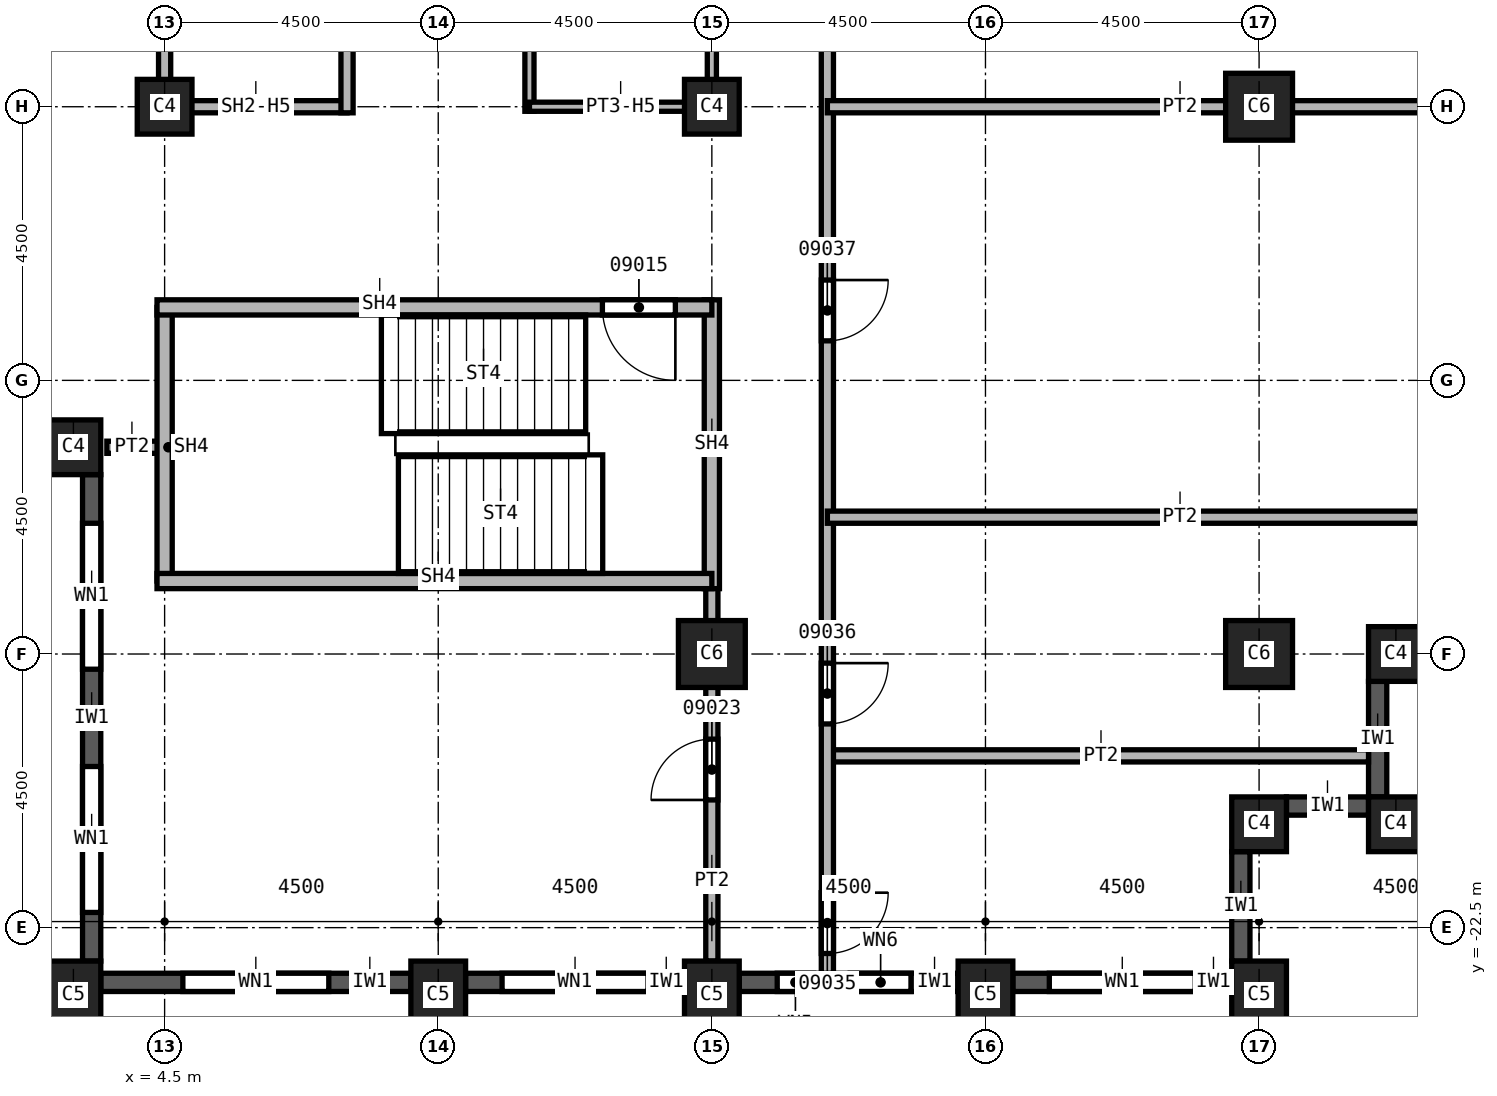
"""IFC4 building model, lengths in metres.
Left out: names, types, materials, properties, quantities, classifications, styles, units other than length and angle.
Written with IfcOpenShell. Run it as: python <this file> out.ifc"""

import sys

from ifc_helpers import new_model, si_unit, direction, frame, frame_2d, origin, origin_2d, place, context, subcontext, project, spatial, rectangle, extrude, element, fill, save


model = new_model("IFC4")
c1 = context("Model", 3, precision=1e-05, world=origin(), true_north=direction((0.0, 1.0)))
c2 = subcontext(c1, "Body", "Model", "MODEL_VIEW")
j1 = project(units=[si_unit("LENGTHUNIT", "METRE"), si_unit("PLANEANGLEUNIT", "RADIAN")], contexts=[c1])
p1 = place(None, origin())
s1 = spatial("IfcSite", under=j1, at=p1, CompositionType="ELEMENT")
p2 = place(p1, origin())
s2 = spatial("IfcBuilding", under=s1, at=p2, CompositionType="ELEMENT")
p3 = place(p2, frame((0.0, 0.0, 166.0)))
s3 = spatial("IfcBuildingStorey", under=s2, at=p3, CompositionType="ELEMENT", Elevation=166.0)
for number, where, z_axis, x_axis in (
    (1, (13.5, -18.0, 0.0), (0.0, 0.0, 1.0), (1.0, 0.0, 0.0)),
    (2, (22.5, -9.0, 0.0), (0.0, 0.0, 1.0), (1.0, 0.0, 0.0)),
    (3, (22.5, -18.0, 0.0), (0.0, 0.0, 1.0), (1.0, 0.0, 0.0)),
):
    element("IfcColumn", number, at=place(p3, frame(where, z_axis=z_axis, x_axis=x_axis)), inside=s3, PredefinedType="COLUMN", context=c2, shape_type="SweptSolid", body=[
        extrude(rectangle(XDim=1.1, YDim=1.1, at=origin_2d()), origin(), (0.0, 0.0, 1.0), 3.7),
    ])
for number, where, z_axis, x_axis in (
    (4, (4.5, -9.0, 0.0), (0.0, 0.0, 1.0), (1.0, 0.0, 0.0)),
    (5, (13.5, -9.0, 0.0), (0.0, 0.0, 1.0), (1.0, 0.0, 0.0)),
):
    element("IfcColumn", number, at=place(p3, frame(where, z_axis=z_axis, x_axis=x_axis)), inside=s3, PredefinedType="COLUMN", context=c2, shape_type="SweptSolid", body=[
        extrude(rectangle(XDim=0.9, YDim=0.9, at=origin_2d()), origin(), (0.0, 0.0, 1.0), 3.7),
    ])
for number, where, z_axis, x_axis in (
    (6, (3.0, -23.6, 0.0), (0.0, 0.0, 1.0), (1.0, 0.0, 0.0)),
    (7, (9.0, -23.6, 0.0), (0.0, 0.0, 1.0), (1.0, 0.0, 0.0)),
    (8, (13.5, -23.6, 0.0), (0.0, 0.0, 1.0), (1.0, 0.0, 0.0)),
    (9, (18.0, -23.6, 0.0), (0.0, 0.0, 1.0), (1.0, 0.0, 0.0)),
    (10, (22.5, -23.6, 0.0), (0.0, 0.0, 1.0), (1.0, 0.0, 0.0)),
):
    element("IfcColumn", number, at=place(p3, frame(where, z_axis=z_axis, x_axis=x_axis)), inside=s3, PredefinedType="COLUMN", context=c2, shape_type="SweptSolid", body=[
        extrude(rectangle(XDim=0.9, YDim=1.1, at=origin_2d()), origin(), (0.0, 0.0, 1.0), 3.7),
    ])
for number, where, z_axis, x_axis in (
    (11, (3.0, -14.6, 0.0), (0.0, 0.0, 1.0), (1.0, 0.0, 0.0)),
    (12, (22.5, -20.8, 0.0), (0.0, 0.0, 1.0), (1.0, 0.0, 0.0)),
    (13, (24.75, -20.8, 0.0), (0.0, 0.0, 1.0), (1.0, 0.0, 0.0)),
    (14, (24.75, -18.0, 0.0), (0.0, 0.0, 1.0), (1.0, 0.0, 0.0)),
):
    element("IfcColumn", number, at=place(p3, frame(where, z_axis=z_axis, x_axis=x_axis)), inside=s3, PredefinedType="COLUMN", context=c2, shape_type="SweptSolid", body=[
        extrude(rectangle(XDim=0.9, YDim=0.9, at=origin_2d()), origin(), (0.0, 0.0, 1.0), 3.7),
    ])
p4 = place(p3, frame((3.3, -15.05, 0.0), z_axis=(0.0, 0.0, 1.0), x_axis=(0.0, -1.0, 0.0)))
e15 = element("IfcWall", 15, at=p4, inside=s3, PredefinedType="SOLIDWALL", context=c2, shape_type="SweptSolid", body=[
    extrude(rectangle(XDim=8.0, YDim=0.3, at=frame_2d((4.0, 0.0))), origin(), (0.0, 0.0, 1.0), 3.1),
])
p5 = place(p4, frame((0.8, 0.0, 0.8)))
e16 = element("IfcOpeningElement", 16, at=p5, cuts=e15, PredefinedType="OPENING", context=c2, shape_type="SweptSolid", body=[
    extrude(rectangle(XDim=2.4, YDim=1.95, at=frame_2d((1.2, 0.975))), frame((0.0, 0.15, 0.0), z_axis=(0.0, -1.0, 0.0), x_axis=(1.0, 0.0, 0.0)), (0.0, 0.0, 1.0), 0.3),
])
p6 = place(p4, frame((4.8, 0.0, 0.8)))
e17 = element("IfcOpeningElement", 17, at=p6, cuts=e15, PredefinedType="OPENING", context=c2, shape_type="SweptSolid", body=[
    extrude(rectangle(XDim=2.4, YDim=1.95, at=frame_2d((1.2, 0.975))), frame((0.0, 0.15, 0.0), z_axis=(0.0, -1.0, 0.0), x_axis=(1.0, 0.0, 0.0)), (0.0, 0.0, 1.0), 0.3),
])
p7 = place(p3, frame((3.45, -23.4, 0.0), z_axis=(0.0, 0.0, 1.0), x_axis=(1.0, 0.0, 0.0)))
e18 = element("IfcWall", 18, at=p7, inside=s3, PredefinedType="SOLIDWALL", context=c2, shape_type="SweptSolid", body=[
    extrude(rectangle(XDim=5.1, YDim=0.3, at=frame_2d((2.55, 0.0))), origin(), (0.0, 0.0, 1.0), 3.1),
])
p8 = place(p7, frame((1.35, 0.0, 0.8)))
e19 = element("IfcOpeningElement", 19, at=p8, cuts=e18, PredefinedType="OPENING", context=c2, shape_type="SweptSolid", body=[
    extrude(rectangle(XDim=2.4, YDim=1.95, at=frame_2d((1.2, 0.975))), frame((0.0, 0.15, 0.0), z_axis=(0.0, -1.0, 0.0), x_axis=(1.0, 0.0, 0.0)), (0.0, 0.0, 1.0), 0.3),
])
p9 = place(p3, frame((9.45, -23.4, 0.0), z_axis=(0.0, 0.0, 1.0), x_axis=(1.0, 0.0, 0.0)))
e20 = element("IfcWall", 20, at=p9, inside=s3, PredefinedType="SOLIDWALL", context=c2, shape_type="SweptSolid", body=[
    extrude(rectangle(XDim=3.6, YDim=0.3, at=frame_2d((1.8, 0.0))), origin(), (0.0, 0.0, 1.0), 3.1),
])
p10 = place(p9, frame((0.6, 0.0, 0.8)))
e21 = element("IfcOpeningElement", 21, at=p10, cuts=e20, PredefinedType="OPENING", context=c2, shape_type="SweptSolid", body=[
    extrude(rectangle(XDim=2.4, YDim=1.95, at=frame_2d((1.2, 0.975))), frame((0.0, 0.15, 0.0), z_axis=(0.0, -1.0, 0.0), x_axis=(1.0, 0.0, 0.0)), (0.0, 0.0, 1.0), 0.3),
])
p11 = place(p3, frame((13.95, -23.4, 0.0), z_axis=(0.0, 0.0, 1.0), x_axis=(1.0, 0.0, 0.0)))
e22 = element("IfcWall", 22, at=p11, inside=s3, PredefinedType="SOLIDWALL", context=c2, shape_type="SweptSolid", body=[
    extrude(rectangle(XDim=3.6, YDim=0.3, at=frame_2d((1.8, 0.0))), origin(), (0.0, 0.0, 1.0), 3.1),
])
p12 = place(p11, frame((0.625, 0.0, 0.8)))
e23 = element("IfcOpeningElement", 23, at=p12, cuts=e22, PredefinedType="OPENING", context=c2, shape_type="SweptSolid", body=[
    extrude(rectangle(XDim=0.6, YDim=1.95, at=frame_2d((0.3, 0.975))), frame((0.0, 0.15, 0.0), z_axis=(0.0, -1.0, 0.0), x_axis=(1.0, 0.0, 0.0)), (0.0, 0.0, 1.0), 0.3),
])
p13 = place(p11, frame((1.825, 0.0, 0.8)))
e24 = element("IfcOpeningElement", 24, at=p13, cuts=e22, PredefinedType="OPENING", context=c2, shape_type="SweptSolid", body=[
    extrude(rectangle(XDim=1.0, YDim=1.95, at=frame_2d((0.5, 0.975))), frame((0.0, 0.15, 0.0), z_axis=(0.0, -1.0, 0.0), x_axis=(1.0, 0.0, 0.0)), (0.0, 0.0, 1.0), 0.3),
])
p14 = place(p3, frame((18.45, -23.4, 0.0), z_axis=(0.0, 0.0, 1.0), x_axis=(1.0, 0.0, 0.0)))
e25 = element("IfcWall", 25, at=p14, inside=s3, PredefinedType="SOLIDWALL", context=c2, shape_type="SweptSolid", body=[
    extrude(rectangle(XDim=3.6, YDim=0.3, at=frame_2d((1.8, 0.0))), origin(), (0.0, 0.0, 1.0), 3.1),
])
p15 = place(p14, frame((0.6, 0.0, 0.8)))
e26 = element("IfcOpeningElement", 26, at=p15, cuts=e25, PredefinedType="OPENING", context=c2, shape_type="SweptSolid", body=[
    extrude(rectangle(XDim=2.4, YDim=1.95, at=frame_2d((1.2, 0.975))), frame((0.0, 0.15, 0.0), z_axis=(0.0, -1.0, 0.0), x_axis=(1.0, 0.0, 0.0)), (0.0, 0.0, 1.0), 0.3),
])
p16 = place(p3, frame((22.2, -23.05, 0.0), z_axis=(0.0, 0.0, 1.0), x_axis=(0.0, 1.0, 0.0)))
e27 = element("IfcWall", 27, at=p16, inside=s3, PredefinedType="SOLIDWALL", context=c2, shape_type="SweptSolid", body=[
    extrude(rectangle(XDim=1.8, YDim=0.3, at=frame_2d((0.9, 0.0))), origin(), (0.0, 0.0, 1.0), 3.1),
])
p17 = place(p3, frame((22.95, -20.5, 0.0), z_axis=(0.0, 0.0, 1.0), x_axis=(1.0, 0.0, 0.0)))
e28 = element("IfcWall", 28, at=p17, inside=s3, PredefinedType="SOLIDWALL", context=c2, shape_type="SweptSolid", body=[
    extrude(rectangle(XDim=1.35, YDim=0.3, at=frame_2d((0.675, 0.0))), origin(), (0.0, 0.0, 1.0), 3.1),
])
p18 = place(p3, frame((24.45, -20.35, 0.0), z_axis=(0.0, 0.0, 1.0), x_axis=(0.0, 1.0, 0.0)))
e29 = element("IfcWall", 29, at=p18, inside=s3, PredefinedType="SOLIDWALL", context=c2, shape_type="SweptSolid", body=[
    extrude(rectangle(XDim=1.9, YDim=0.3, at=frame_2d((0.95, 0.0))), origin(), (0.0, 0.0, 1.0), 3.1),
])
p19 = place(p3, frame((4.5, -14.6, 0.0), z_axis=(0.0, 0.0, 1.0), x_axis=(-1.0, 0.0, 0.0)))
e30 = element("IfcWall", 30, at=p19, inside=s3, PredefinedType="PARTITIONING", context=c2, shape_type="SweptSolid", body=[
    extrude(rectangle(XDim=0.95, YDim=0.2, at=frame_2d((0.475, 0.0))), origin(), (0.0, 0.0, 1.0), 3.7),
])
p20 = place(p3, frame((13.5, -23.05, 0.0), z_axis=(0.0, 0.0, 1.0), x_axis=(0.0, 1.0, 0.0)))
e31 = element("IfcWall", 31, at=p20, inside=s3, PredefinedType="PARTITIONING", context=c2, shape_type="SweptSolid", body=[
    extrude(rectangle(XDim=6.375, YDim=0.2, at=frame_2d((3.188, 0.0))), origin(), (0.0, 0.0, 1.0), 3.7),
])
p21 = place(p20, frame((2.65, 0.0, 0.0)))
e32 = element("IfcOpeningElement", 32, at=p21, cuts=e31, PredefinedType="OPENING", context=c2, shape_type="SweptSolid", body=[
    extrude(rectangle(XDim=1.0, YDim=2.1, at=frame_2d((0.5, 1.05))), frame((0.0, 0.1, 0.0), z_axis=(0.0, -1.0, 0.0), x_axis=(1.0, 0.0, 0.0)), (0.0, 0.0, 1.0), 0.2),
])
p22 = place(p3, frame((15.4, -19.675, 0.0), z_axis=(0.0, 0.0, 1.0), x_axis=(1.0, 0.0, 0.0)))
e33 = element("IfcWall", 33, at=p22, inside=s3, PredefinedType="PARTITIONING", context=c2, shape_type="SweptSolid", body=[
    extrude(rectangle(XDim=8.9, YDim=0.2, at=frame_2d((4.45, 0.0))), origin(), (0.0, 0.0, 1.0), 3.7),
])
p23 = place(p3, frame((15.4, -3.65, 0.0), z_axis=(0.0, 0.0, 1.0), x_axis=(0.0, -1.0, 0.0)))
e34 = element("IfcWall", 34, at=p23, inside=s3, PredefinedType="PARTITIONING", context=c2, shape_type="SweptSolid", body=[
    extrude(rectangle(XDim=19.6, YDim=0.2, at=frame_2d((9.8, 0.0))), origin(), (0.0, 0.0, 1.0), 3.7),
])
p24 = place(p23, frame((18.275, 0.0, 0.0)))
e35 = element("IfcOpeningElement", 35, at=p24, cuts=e34, PredefinedType="OPENING", context=c2, shape_type="SweptSolid", body=[
    extrude(rectangle(XDim=1.0, YDim=2.1, at=frame_2d((0.5, 1.05))), frame((0.0, 0.1, 0.0), z_axis=(0.0, -1.0, 0.0), x_axis=(1.0, 0.0, 0.0)), (0.0, 0.0, 1.0), 0.2),
])
p25 = place(p23, frame((14.5, 0.0, 0.0)))
e36 = element("IfcOpeningElement", 36, at=p25, cuts=e34, PredefinedType="OPENING", context=c2, shape_type="SweptSolid", body=[
    extrude(rectangle(XDim=1.0, YDim=2.1, at=frame_2d((0.5, 1.05))), frame((0.0, 0.1, 0.0), z_axis=(0.0, -1.0, 0.0), x_axis=(1.0, 0.0, 0.0)), (0.0, 0.0, 1.0), 0.2),
])
p26 = place(p23, frame((8.2, 0.0, 0.0)))
e37 = element("IfcOpeningElement", 37, at=p26, cuts=e34, PredefinedType="OPENING", context=c2, shape_type="SweptSolid", body=[
    extrude(rectangle(XDim=1.0, YDim=2.1, at=frame_2d((0.5, 1.05))), frame((0.0, 0.1, 0.0), z_axis=(0.0, -1.0, 0.0), x_axis=(1.0, 0.0, 0.0)), (0.0, 0.0, 1.0), 0.2),
])
for number, where, z_axis, x_axis in (
    (38, (15.4, -15.75, 0.0), (0.0, 0.0, 1.0), (1.0, 0.0, 0.0)),
    (39, (15.4, -9.0, 0.0), (0.0, 0.0, 1.0), (1.0, 0.0, 0.0)),
):
    element("IfcWall", number, at=place(p3, frame(where, z_axis=z_axis, x_axis=x_axis)), inside=s3, PredefinedType="PARTITIONING", context=c2, shape_type="SweptSolid", body=[
        extrude(rectangle(XDim=11.7, YDim=0.2, at=frame_2d((5.85, 0.0))), origin(), (0.0, 0.0, 1.0), 3.7),
    ])
p27 = place(p3, frame((4.5, -9.1, 0.0), z_axis=(0.0, 0.0, 1.0), x_axis=(0.0, 1.0, 0.0)))
e40 = element("IfcWall", 40, at=p27, inside=s3, PredefinedType="SOLIDWALL", context=c2, shape_type="SweptSolid", body=[
    extrude(rectangle(XDim=9.1, YDim=0.2, at=frame_2d((4.55, 0.0))), origin(), (0.0, 0.0, 1.0), 2.938),
])
p28 = place(p27, frame((3.1, 0.0, 0.0)))
e41 = element("IfcOpeningElement", 41, at=p28, cuts=e40, PredefinedType="OPENING", context=c2, shape_type="SweptSolid", body=[
    extrude(rectangle(XDim=1.1, YDim=2.1, at=frame_2d((0.55, 1.05))), frame((0.0, 0.1, 0.0), z_axis=(0.0, -1.0, 0.0), x_axis=(1.0, 0.0, 0.0)), (0.0, 0.0, 1.0), 0.2),
])
p29 = place(p3, frame((7.5, -9.0, 0.0), z_axis=(0.0, 0.0, 1.0), x_axis=(-1.0, 0.0, 0.0)))
e42 = element("IfcWall", 42, at=p29, inside=s3, PredefinedType="SOLIDWALL", context=c2, shape_type="SweptSolid", body=[
    extrude(rectangle(XDim=3.0, YDim=0.2, at=frame_2d((1.5, 0.0))), origin(), (0.0, 0.0, 1.0), 2.938),
])
p30 = place(p3, frame((7.5, -2.875, 0.0), z_axis=(0.0, 0.0, 1.0), x_axis=(0.0, -1.0, 0.0)))
e43 = element("IfcWall", 43, at=p30, inside=s3, PredefinedType="SOLIDWALL", context=c2, shape_type="SweptSolid", body=[
    extrude(rectangle(XDim=6.225, YDim=0.2, at=frame_2d((3.113, 0.0))), origin(), (0.0, 0.0, 1.0), 3.7),
])
p31 = place(p3, frame((4.5, -16.8, 0.0), z_axis=(0.0, 0.0, 1.0), x_axis=(0.0, 1.0, 0.0)))
e44 = element("IfcWall", 44, at=p31, inside=s3, PredefinedType="SOLIDWALL", context=c2, shape_type="SweptSolid", body=[
    extrude(rectangle(XDim=4.5, YDim=0.25, at=frame_2d((2.25, 0.0))), origin(), (0.0, 0.0, 1.0), 3.7),
])
p32 = place(p3, frame((13.5, -16.925, 0.0), z_axis=(0.0, 0.0, 1.0), x_axis=(0.0, 1.0, 0.0)))
e45 = element("IfcWall", 45, at=p32, inside=s3, PredefinedType="SOLIDWALL", context=c2, shape_type="SweptSolid", body=[
    extrude(rectangle(XDim=4.75, YDim=0.25, at=frame_2d((2.375, 0.0))), origin(), (0.0, 0.0, 1.0), 3.7),
])
p33 = place(p3, frame((13.5, -16.8, 0.0), z_axis=(0.0, 0.0, 1.0), x_axis=(-1.0, 0.0, 0.0)))
e46 = element("IfcWall", 46, at=p33, inside=s3, PredefinedType="SOLIDWALL", context=c2, shape_type="SweptSolid", body=[
    extrude(rectangle(XDim=9.125, YDim=0.25, at=frame_2d((4.562, 0.0))), origin(), (0.0, 0.0, 1.0), 3.7),
])
p34 = place(p3, frame((13.5, -12.3, 0.0), z_axis=(0.0, 0.0, 1.0), x_axis=(-1.0, 0.0, 0.0)))
e47 = element("IfcWall", 47, at=p34, inside=s3, PredefinedType="SOLIDWALL", context=c2, shape_type="SweptSolid", body=[
    extrude(rectangle(XDim=9.125, YDim=0.25, at=frame_2d((4.562, 0.0))), origin(), (0.0, 0.0, 1.0), 3.7),
])
p35 = place(p34, frame((0.6, 0.0, 0.0)))
e48 = element("IfcOpeningElement", 48, at=p35, cuts=e47, PredefinedType="OPENING", context=c2, shape_type="SweptSolid", body=[
    extrude(rectangle(XDim=1.2, YDim=2.1, at=frame_2d((0.6, 1.05))), frame((0.0, 0.125, 0.0), z_axis=(0.0, -1.0, 0.0), x_axis=(1.0, 0.0, 0.0)), (0.0, 0.0, 1.0), 0.25),
])
p36 = place(p3, frame((10.5, -4.425, 0.0), z_axis=(0.0, 0.0, 1.0), x_axis=(0.0, -1.0, 0.0)))
e49 = element("IfcWall", 49, at=p36, inside=s3, PredefinedType="PARTITIONING", context=c2, shape_type="SweptSolid", body=[
    extrude(rectangle(XDim=4.65, YDim=0.15, at=frame_2d((2.325, 0.0))), origin(), (0.0, 0.0, 1.0), 3.7),
])
p37 = place(p36, frame((0.25, 0.0, 0.0)))
e50 = element("IfcOpeningElement", 50, at=p37, cuts=e49, PredefinedType="OPENING", context=c2, shape_type="SweptSolid", body=[
    extrude(rectangle(XDim=0.9, YDim=2.1, at=frame_2d((0.45, 1.05))), frame((0.0, 0.075, 0.0), z_axis=(0.0, -1.0, 0.0), x_axis=(1.0, 0.0, 0.0)), (0.0, 0.0, 1.0), 0.15),
])
p38 = place(p3, frame((13.5, -9.0, 0.0), z_axis=(0.0, 0.0, 1.0), x_axis=(-1.0, 0.0, 0.0)))
e51 = element("IfcWall", 51, at=p38, inside=s3, PredefinedType="PARTITIONING", context=c2, shape_type="SweptSolid", body=[
    extrude(rectangle(XDim=3.0, YDim=0.15, at=frame_2d((1.5, 0.0))), origin(), (0.0, 0.0, 1.0), 2.938),
])
p39 = place(p3, frame((13.5, -4.5, 0.0), z_axis=(0.0, 0.0, 1.0), x_axis=(0.0, -1.0, 0.0)))
e52 = element("IfcWall", 52, at=p39, inside=s3, PredefinedType="PARTITIONING", context=c2, shape_type="SweptSolid", body=[
    extrude(rectangle(XDim=4.575, YDim=0.15, at=frame_2d((2.288, 0.0))), origin(), (0.0, 0.0, 1.0), 2.938),
])
p40 = place(p5, origin())
e53 = element("IfcWindow", 53, at=p40, inside=s3, PartitioningType="SINGLE_PANEL", PredefinedType="WINDOW", context=c2, shape_type="SweptSolid", body=[
    extrude(rectangle(XDim=2.4, YDim=1.95, at=frame_2d((1.2, 0.975))), frame((0.0, 0.03, 0.0), z_axis=(0.0, -1.0, 0.0), x_axis=(1.0, 0.0, 0.0)), (0.0, 0.0, 1.0), 0.06),
])
fill(e16, e53)
p41 = place(p6, origin())
e54 = element("IfcWindow", 54, at=p41, inside=s3, PartitioningType="SINGLE_PANEL", PredefinedType="WINDOW", context=c2, shape_type="SweptSolid", body=[
    extrude(rectangle(XDim=2.4, YDim=1.95, at=frame_2d((1.2, 0.975))), frame((0.0, 0.03, 0.0), z_axis=(0.0, -1.0, 0.0), x_axis=(1.0, 0.0, 0.0)), (0.0, 0.0, 1.0), 0.06),
])
fill(e17, e54)
p42 = place(p8, origin())
e55 = element("IfcWindow", 55, at=p42, inside=s3, PartitioningType="SINGLE_PANEL", PredefinedType="WINDOW", context=c2, shape_type="SweptSolid", body=[
    extrude(rectangle(XDim=2.4, YDim=1.95, at=frame_2d((1.2, 0.975))), frame((0.0, 0.03, 0.0), z_axis=(0.0, -1.0, 0.0), x_axis=(1.0, 0.0, 0.0)), (0.0, 0.0, 1.0), 0.06),
])
fill(e19, e55)
p43 = place(p10, origin())
e56 = element("IfcWindow", 56, at=p43, inside=s3, PartitioningType="SINGLE_PANEL", PredefinedType="WINDOW", context=c2, shape_type="SweptSolid", body=[
    extrude(rectangle(XDim=2.4, YDim=1.95, at=frame_2d((1.2, 0.975))), frame((0.0, 0.03, 0.0), z_axis=(0.0, -1.0, 0.0), x_axis=(1.0, 0.0, 0.0)), (0.0, 0.0, 1.0), 0.06),
])
fill(e21, e56)
p44 = place(p15, origin())
e57 = element("IfcWindow", 57, at=p44, inside=s3, PartitioningType="SINGLE_PANEL", PredefinedType="WINDOW", context=c2, shape_type="SweptSolid", body=[
    extrude(rectangle(XDim=2.4, YDim=1.95, at=frame_2d((1.2, 0.975))), frame((0.0, 0.03, 0.0), z_axis=(0.0, -1.0, 0.0), x_axis=(1.0, 0.0, 0.0)), (0.0, 0.0, 1.0), 0.06),
])
fill(e26, e57)
p45 = place(p35, origin())
e58 = element("IfcDoor", 58, at=p45, inside=s3, OperationType="SINGLE_SWING_RIGHT", PredefinedType="DOOR", context=c2, shape_type="SweptSolid", body=[
    extrude(rectangle(XDim=1.2, YDim=2.1, at=frame_2d((0.6, 1.05))), frame((0.0, 0.025, 0.0), z_axis=(0.0, -1.0, 0.0), x_axis=(1.0, 0.0, 0.0)), (0.0, 0.0, 1.0), 0.05),
])
fill(e48, e58)
p46 = place(p21, origin())
e59 = element("IfcDoor", 59, at=p46, inside=s3, OperationType="SINGLE_SWING_RIGHT", PredefinedType="DOOR", context=c2, shape_type="SweptSolid", body=[
    extrude(rectangle(XDim=1.0, YDim=2.1, at=frame_2d((0.5, 1.05))), frame((0.0, 0.025, 0.0), z_axis=(0.0, -1.0, 0.0), x_axis=(1.0, 0.0, 0.0)), (0.0, 0.0, 1.0), 0.05),
])
fill(e32, e59)
p47 = place(p24, origin())
e60 = element("IfcDoor", 60, at=p47, inside=s3, OperationType="SINGLE_SWING_RIGHT", PredefinedType="DOOR", context=c2, shape_type="SweptSolid", body=[
    extrude(rectangle(XDim=1.0, YDim=2.1, at=frame_2d((0.5, 1.05))), frame((0.0, 0.025, 0.0), z_axis=(0.0, -1.0, 0.0), x_axis=(1.0, 0.0, 0.0)), (0.0, 0.0, 1.0), 0.05),
])
fill(e35, e60)
p48 = place(p25, origin())
e61 = element("IfcDoor", 61, at=p48, inside=s3, OperationType="SINGLE_SWING_LEFT", PredefinedType="DOOR", context=c2, shape_type="SweptSolid", body=[
    extrude(rectangle(XDim=1.0, YDim=2.1, at=frame_2d((0.5, 1.05))), frame((0.0, 0.025, 0.0), z_axis=(0.0, -1.0, 0.0), x_axis=(1.0, 0.0, 0.0)), (0.0, 0.0, 1.0), 0.05),
])
fill(e36, e61)
p49 = place(p26, origin())
e62 = element("IfcDoor", 62, at=p49, inside=s3, OperationType="SINGLE_SWING_RIGHT", PredefinedType="DOOR", context=c2, shape_type="SweptSolid", body=[
    extrude(rectangle(XDim=1.0, YDim=2.1, at=frame_2d((0.5, 1.05))), frame((0.0, 0.025, 0.0), z_axis=(0.0, -1.0, 0.0), x_axis=(1.0, 0.0, 0.0)), (0.0, 0.0, 1.0), 0.05),
])
fill(e37, e62)
p50 = place(p12, origin())
e63 = element("IfcWindow", 63, at=p50, inside=s3, PartitioningType="SINGLE_PANEL", PredefinedType="WINDOW", context=c2, shape_type="SweptSolid", body=[
    extrude(rectangle(XDim=0.6, YDim=1.95, at=frame_2d((0.3, 0.975))), frame((0.0, 0.03, 0.0), z_axis=(0.0, -1.0, 0.0), x_axis=(1.0, 0.0, 0.0)), (0.0, 0.0, 1.0), 0.06),
])
fill(e23, e63)
p51 = place(p13, origin())
e64 = element("IfcWindow", 64, at=p51, inside=s3, PartitioningType="SINGLE_PANEL", PredefinedType="WINDOW", context=c2, shape_type="SweptSolid", body=[
    extrude(rectangle(XDim=1.0, YDim=1.95, at=frame_2d((0.5, 0.975))), frame((0.0, 0.03, 0.0), z_axis=(0.0, -1.0, 0.0), x_axis=(1.0, 0.0, 0.0)), (0.0, 0.0, 1.0), 0.06),
])
fill(e24, e64)
save(model, sys.argv[1])
